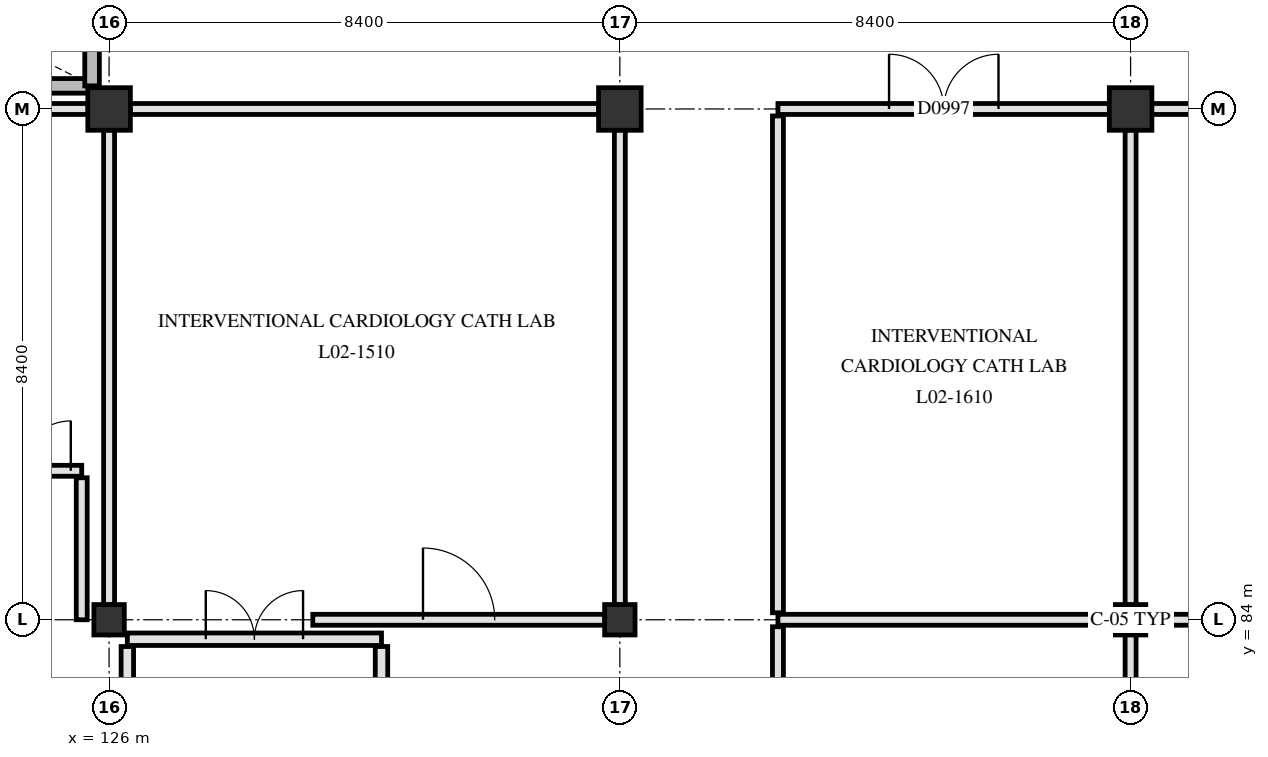
"""IFC4 building model, lengths in metres.
Left out: names, types, materials, properties, quantities, classifications, styles, units other than length and angle.
Written with IfcOpenShell. Run it as: python <this file> out.ifc"""

import sys

from ifc_helpers import new_model, si_unit, direction, frame, frame_2d, origin, origin_2d, place, context, subcontext, project, spatial, rectangle, extrude, element, fill, save


model = new_model("IFC4")
c1 = context("Model", 3, precision=1e-05, world=origin(), true_north=direction((0.0, 1.0)))
c2 = subcontext(c1, "Body", "Model", "MODEL_VIEW")
j1 = project(units=[si_unit("LENGTHUNIT", "METRE"), si_unit("PLANEANGLEUNIT", "RADIAN")], contexts=[c1])
p1 = place(None, origin())
s1 = spatial("IfcSite", under=j1, at=p1, CompositionType="ELEMENT")
p2 = place(p1, origin())
s2 = spatial("IfcBuilding", under=s1, at=p2, CompositionType="ELEMENT")
p3 = place(p2, frame((0.0, 0.0, 9.3)))
s3 = spatial("IfcBuildingStorey", under=s2, at=p3, CompositionType="ELEMENT", Elevation=9.3)
p4 = place(p3, frame((126.0, 84.0, 0.0), z_axis=(0.0, 0.0, 1.0), x_axis=(1.0, 0.0, 0.0)))
e1 = element("IfcColumn", 1, at=p4, inside=s3, PredefinedType="COLUMN", context=c2, shape_type="SweptSolid", body=[
    extrude(rectangle(XDim=0.5, YDim=0.5, at=origin_2d()), origin(), (0.0, 0.0, 1.0), 5.1),
])
p5 = place(p3, frame((126.0, 92.4, 0.0), z_axis=(0.0, 0.0, 1.0), x_axis=(1.0, 0.0, 0.0)))
e2 = element("IfcColumn", 2, at=p5, inside=s3, PredefinedType="COLUMN", context=c2, shape_type="SweptSolid", body=[
    extrude(rectangle(XDim=0.7, YDim=0.7, at=origin_2d()), origin(), (0.0, 0.0, 1.0), 5.1),
])
p6 = place(p3, frame((134.4, 84.0, 0.0), z_axis=(0.0, 0.0, 1.0), x_axis=(1.0, 0.0, 0.0)))
e3 = element("IfcColumn", 3, at=p6, inside=s3, PredefinedType="COLUMN", context=c2, shape_type="SweptSolid", body=[
    extrude(rectangle(XDim=0.5, YDim=0.5, at=origin_2d()), origin(), (0.0, 0.0, 1.0), 5.1),
])
p7 = place(p3, frame((134.4, 92.4, 0.0), z_axis=(0.0, 0.0, 1.0), x_axis=(1.0, 0.0, 0.0)))
e4 = element("IfcColumn", 4, at=p7, inside=s3, PredefinedType="COLUMN", context=c2, shape_type="SweptSolid", body=[
    extrude(rectangle(XDim=0.7, YDim=0.7, at=origin_2d()), origin(), (0.0, 0.0, 1.0), 5.1),
])
p8 = place(p3, frame((142.8, 84.0, 0.0), z_axis=(0.0, 0.0, 1.0), x_axis=(1.0, 0.0, 0.0)))
e5 = element("IfcColumn", 5, at=p8, inside=s3, PredefinedType="COLUMN", context=c2, shape_type="SweptSolid", body=[
    extrude(rectangle(XDim=0.5, YDim=0.5, at=origin_2d()), origin(), (0.0, 0.0, 1.0), 5.1),
])
p9 = place(p3, frame((142.8, 92.4, 0.0), z_axis=(0.0, 0.0, 1.0), x_axis=(1.0, 0.0, 0.0)))
e6 = element("IfcColumn", 6, at=p9, inside=s3, PredefinedType="COLUMN", context=c2, shape_type="SweptSolid", body=[
    extrude(rectangle(XDim=0.7, YDim=0.7, at=origin_2d()), origin(), (0.0, 0.0, 1.0), 5.1),
])
p10 = place(p3, frame((117.9, 92.78, 0.0), z_axis=(0.0, 0.0, 1.0), x_axis=(1.0, 0.0, 0.0)))
e7 = element("IfcWall", 7, at=p10, inside=s3, PredefinedType="SHEAR", context=c2, shape_type="SweptSolid", body=[
    extrude(rectangle(XDim=7.82, YDim=0.24, at=frame_2d((3.91, 0.0))), origin(), (0.0, 0.0, 1.0), 4.78),
])
p11 = place(p3, frame((125.72, 92.78, 0.0), z_axis=(0.0, 0.0, 1.0), x_axis=(0.0, 1.0, 0.0)))
e8 = element("IfcWall", 8, at=p11, inside=s3, PredefinedType="SHEAR", context=c2, shape_type="SweptSolid", body=[
    extrude(rectangle(XDim=3.32, YDim=0.24, at=frame_2d((1.66, 0.0))), origin(), (0.0, 0.0, 1.0), 4.78),
])
p12 = place(p3, frame((130.48, 79.44, 0.0), z_axis=(0.0, 0.0, 1.0), x_axis=(0.0, 1.0, 0.0)))
e9 = element("IfcWall", 9, at=p12, inside=s3, PredefinedType="PARTITIONING", context=c2, shape_type="SweptSolid", body=[
    extrude(rectangle(XDim=4.12, YDim=0.205, at=frame_2d((2.06, 0.0))), origin(), (0.0, 0.0, 1.0), 4.77),
])
p13 = place(p3, frame((126.3, 79.44, 0.0), z_axis=(0.0, 0.0, 1.0), x_axis=(0.0, 1.0, 0.0)))
e10 = element("IfcWall", 10, at=p13, inside=s3, PredefinedType="PARTITIONING", context=c2, shape_type="SweptSolid", body=[
    extrude(rectangle(XDim=4.12, YDim=0.205, at=frame_2d((2.06, 0.0))), origin(), (0.0, 0.0, 1.0), 4.17),
])
p14 = place(p3, frame((126.3, 83.68, 0.0), z_axis=(0.0, 0.0, 1.0), x_axis=(1.0, 0.0, 0.0)))
e11 = element("IfcWall", 11, at=p14, inside=s3, PredefinedType="PARTITIONING", context=c2, shape_type="SweptSolid", body=[
    extrude(rectangle(XDim=4.18, YDim=0.205, at=frame_2d((2.09, 0.0))), origin(), (0.0, 0.0, 1.0), 4.17),
])
p15 = place(p14, frame((1.29, 0.0, 0.0)))
e12 = element("IfcOpeningElement", 12, at=p15, cuts=e11, PredefinedType="OPENING", context=c2, shape_type="SweptSolid", body=[
    extrude(rectangle(XDim=1.6, YDim=2.25, at=frame_2d((0.8, 1.125))), frame((0.0, 0.113, 0.0), z_axis=(0.0, -1.0, 0.0), x_axis=(1.0, 0.0, 0.0)), (0.0, 0.0, 1.0), 0.225),
])
p16 = place(p3, frame((129.35, 84.0, 0.0), z_axis=(0.0, 0.0, 1.0), x_axis=(1.0, 0.0, 0.0)))
e13 = element("IfcWall", 13, at=p16, inside=s3, PredefinedType="PARTITIONING", context=c2, shape_type="SweptSolid", body=[
    extrude(rectangle(XDim=4.805, YDim=0.18, at=frame_2d((2.402, 0.0))), origin(), (0.0, 0.0, 1.0), 4.17),
])
p17 = place(p16, frame((1.812, 0.0, 0.0)))
e14 = element("IfcOpeningElement", 14, at=p17, cuts=e13, PredefinedType="OPENING", context=c2, shape_type="SweptSolid", body=[
    extrude(rectangle(XDim=1.18, YDim=2.18, at=frame_2d((0.59, 1.09))), frame((0.0, 0.1, 0.0), z_axis=(0.0, -1.0, 0.0), x_axis=(1.0, 0.0, 0.0)), (0.0, 0.0, 1.0), 0.2),
])
p18 = place(p3, frame((137.0, 84.0, 0.0), z_axis=(0.0, 0.0, 1.0), x_axis=(1.0, 0.0, 0.0)))
e15 = element("IfcWall", 15, at=p18, inside=s3, PredefinedType="PARTITIONING", context=c2, shape_type="SweptSolid", body=[
    extrude(rectangle(XDim=5.555, YDim=0.18, at=frame_2d((2.777, 0.0))), origin(), (0.0, 0.0, 1.0), 4.17),
])
p19 = place(p3, frame((143.045, 84.0, 0.0), z_axis=(0.0, 0.0, 1.0), x_axis=(1.0, 0.0, 0.0)))
e16 = element("IfcWall", 16, at=p19, inside=s3, PredefinedType="PARTITIONING", context=c2, shape_type="SweptSolid", body=[
    extrude(rectangle(XDim=7.91, YDim=0.18, at=frame_2d((3.955, 0.0))), origin(), (0.0, 0.0, 1.0), 4.17),
])
p20 = place(p19, frame((3.48, 0.0, 0.0)))
e17 = element("IfcOpeningElement", 17, at=p20, cuts=e16, PredefinedType="OPENING", context=c2, shape_type="SweptSolid", body=[
    extrude(rectangle(XDim=0.95, YDim=2.1, at=frame_2d((0.475, 1.05))), frame((0.0, 0.1, 0.0), z_axis=(0.0, -1.0, 0.0), x_axis=(1.0, 0.0, 0.0)), (0.0, 0.0, 1.0), 0.2),
])
p21 = place(p3, frame((123.55, 86.45, 0.0), z_axis=(0.0, 0.0, 1.0), x_axis=(1.0, 0.0, 0.0)))
e18 = element("IfcWall", 18, at=p21, inside=s3, PredefinedType="PARTITIONING", context=c2, shape_type="SweptSolid", body=[
    extrude(rectangle(XDim=2.0, YDim=0.18, at=frame_2d((1.0, 0.0))), origin(), (0.0, 0.0, 1.0), 4.77),
])
p22 = place(p21, frame((0.18, 0.0, 0.0)))
e19 = element("IfcOpeningElement", 19, at=p22, cuts=e18, PredefinedType="OPENING", context=c2, shape_type="SweptSolid", body=[
    extrude(rectangle(XDim=1.64, YDim=2.28, at=frame_2d((0.82, 1.14))), frame((0.0, 0.1, 0.0), z_axis=(0.0, -1.0, 0.0), x_axis=(1.0, 0.0, 0.0)), (0.0, 0.0, 1.0), 0.2),
])
for number, where, z_axis, x_axis in (
    (20, (117.945, 92.4, 0.0), (0.0, 0.0, 1.0), (1.0, 0.0, 0.0)),
    (21, (126.345, 92.4, 0.0), (0.0, 0.0, 1.0), (1.0, 0.0, 0.0)),
):
    element("IfcWall", number, at=place(p3, frame(where, z_axis=z_axis, x_axis=x_axis)), inside=s3, PredefinedType="PARTITIONING", context=c2, shape_type="SweptSolid", body=[
        extrude(rectangle(XDim=7.71, YDim=0.18, at=frame_2d((3.855, 0.0))), origin(), (0.0, 0.0, 1.0), 4.17),
    ])
p23 = place(p3, frame((137.0, 92.4, 0.0), z_axis=(0.0, 0.0, 1.0), x_axis=(1.0, 0.0, 0.0)))
e22 = element("IfcWall", 22, at=p23, inside=s3, PredefinedType="PARTITIONING", context=c2, shape_type="SweptSolid", body=[
    extrude(rectangle(XDim=5.455, YDim=0.18, at=frame_2d((2.728, 0.0))), origin(), (0.0, 0.0, 1.0), 4.17),
])
p24 = place(p23, frame((1.827, 0.0, 0.0)))
e23 = element("IfcOpeningElement", 23, at=p24, cuts=e22, PredefinedType="OPENING", context=c2, shape_type="SweptSolid", body=[
    extrude(rectangle(XDim=1.8, YDim=2.25, at=frame_2d((0.9, 1.125))), frame((0.0, 0.1, 0.0), z_axis=(0.0, -1.0, 0.0), x_axis=(1.0, 0.0, 0.0)), (0.0, 0.0, 1.0), 0.2),
])
p25 = place(p3, frame((143.145, 92.4, 0.0), z_axis=(0.0, 0.0, 1.0), x_axis=(1.0, 0.0, 0.0)))
e24 = element("IfcWall", 24, at=p25, inside=s3, PredefinedType="PARTITIONING", context=c2, shape_type="SweptSolid", body=[
    extrude(rectangle(XDim=7.71, YDim=0.18, at=frame_2d((3.855, 0.0))), origin(), (0.0, 0.0, 1.0), 4.17),
])
p26 = place(p25, frame((3.305, 0.0, 0.0)))
e25 = element("IfcOpeningElement", 25, at=p26, cuts=e24, PredefinedType="OPENING", context=c2, shape_type="SweptSolid", body=[
    extrude(rectangle(XDim=1.1, YDim=2.15, at=frame_2d((0.55, 1.075))), frame((0.0, 0.1, 0.0), z_axis=(0.0, -1.0, 0.0), x_axis=(1.0, 0.0, 0.0)), (0.0, 0.0, 1.0), 0.2),
])
p27 = place(p3, frame((125.55, 84.0, 0.0), z_axis=(0.0, 0.0, 1.0), x_axis=(0.0, 1.0, 0.0)))
e26 = element("IfcWall", 26, at=p27, inside=s3, PredefinedType="PARTITIONING", context=c2, shape_type="SweptSolid", body=[
    extrude(rectangle(XDim=2.335, YDim=0.18, at=frame_2d((1.167, 0.0))), origin(), (0.0, 0.0, 1.0), 4.17),
])
for number, where, z_axis, x_axis in (
    (27, (126.0, 84.245, 0.0), (0.0, 0.0, 1.0), (0.0, 1.0, 0.0)),
    (28, (134.4, 84.245, 0.0), (0.0, 0.0, 1.0), (0.0, 1.0, 0.0)),
):
    element("IfcWall", number, at=place(p3, frame(where, z_axis=z_axis, x_axis=x_axis)), inside=s3, PredefinedType="PARTITIONING", context=c2, shape_type="SweptSolid", body=[
        extrude(rectangle(XDim=7.81, YDim=0.18, at=frame_2d((3.905, 0.0))), origin(), (0.0, 0.0, 1.0), 4.17),
    ])
p28 = place(p3, frame((137.0, 78.315, 0.0), z_axis=(0.0, 0.0, 1.0), x_axis=(0.0, 1.0, 0.0)))
e29 = element("IfcWall", 29, at=p28, inside=s3, PredefinedType="PARTITIONING", context=c2, shape_type="SweptSolid", body=[
    extrude(rectangle(XDim=5.57, YDim=0.18, at=frame_2d((2.785, 0.0))), origin(), (0.0, 0.0, 1.0), 4.17),
])
p29 = place(p3, frame((137.0, 84.115, 0.0), z_axis=(0.0, 0.0, 1.0), x_axis=(0.0, 1.0, 0.0)))
e30 = element("IfcWall", 30, at=p29, inside=s3, PredefinedType="PARTITIONING", context=c2, shape_type="SweptSolid", body=[
    extrude(rectangle(XDim=8.17, YDim=0.18, at=frame_2d((4.085, 0.0))), origin(), (0.0, 0.0, 1.0), 4.17),
])
p30 = place(p3, frame((142.8, 78.315, 0.0), z_axis=(0.0, 0.0, 1.0), x_axis=(0.0, 1.0, 0.0)))
e31 = element("IfcWall", 31, at=p30, inside=s3, PredefinedType="PARTITIONING", context=c2, shape_type="SweptSolid", body=[
    extrude(rectangle(XDim=5.44, YDim=0.18, at=frame_2d((2.72, 0.0))), origin(), (0.0, 0.0, 1.0), 4.77),
])
p31 = place(p3, frame((142.8, 84.245, 0.0), z_axis=(0.0, 0.0, 1.0), x_axis=(0.0, 1.0, 0.0)))
e32 = element("IfcWall", 32, at=p31, inside=s3, PredefinedType="PARTITIONING", context=c2, shape_type="SweptSolid", body=[
    extrude(rectangle(XDim=7.81, YDim=0.18, at=frame_2d((3.905, 0.0))), origin(), (0.0, 0.0, 1.0), 4.17),
])
p32 = place(p15, origin())
e33 = element("IfcDoor", 33, at=p32, inside=s3, OperationType="DOUBLE_SWING_LEFT", PredefinedType="DOOR", context=c2, shape_type="SweptSolid", body=[
    extrude(rectangle(XDim=1.6, YDim=2.25, at=frame_2d((0.8, 1.125))), frame((0.0, 0.025, 0.0), z_axis=(0.0, -1.0, 0.0), x_axis=(1.0, 0.0, 0.0)), (0.0, 0.0, 1.0), 0.05),
])
fill(e12, e33)
p33 = place(p22, origin())
e34 = element("IfcDoor", 34, at=p33, inside=s3, OperationType="DOUBLE_SWING_LEFT", PredefinedType="DOOR", context=c2, shape_type="SweptSolid", body=[
    extrude(rectangle(XDim=1.64, YDim=2.28, at=frame_2d((0.82, 1.14))), frame((0.0, 0.025, 0.0), z_axis=(0.0, -1.0, 0.0), x_axis=(1.0, 0.0, 0.0)), (0.0, 0.0, 1.0), 0.05),
])
fill(e19, e34)
p34 = place(p17, origin())
e35 = element("IfcDoor", 35, at=p34, inside=s3, OperationType="SINGLE_SWING_LEFT", PredefinedType="DOOR", context=c2, shape_type="SweptSolid", body=[
    extrude(rectangle(XDim=1.18, YDim=2.18, at=frame_2d((0.59, 1.09))), frame((0.0, 0.025, 0.0), z_axis=(0.0, -1.0, 0.0), x_axis=(1.0, 0.0, 0.0)), (0.0, 0.0, 1.0), 0.05),
])
fill(e14, e35)
p35 = place(p24, origin())
e36 = element("IfcDoor", 36, at=p35, inside=s3, OperationType="DOUBLE_SWING_RIGHT", PredefinedType="DOOR", context=c2, shape_type="SweptSolid", body=[
    extrude(rectangle(XDim=1.8, YDim=2.25, at=frame_2d((0.9, 1.125))), frame((0.0, 0.025, 0.0), z_axis=(0.0, -1.0, 0.0), x_axis=(1.0, 0.0, 0.0)), (0.0, 0.0, 1.0), 0.05),
])
fill(e23, e36)
save(model, sys.argv[1])
